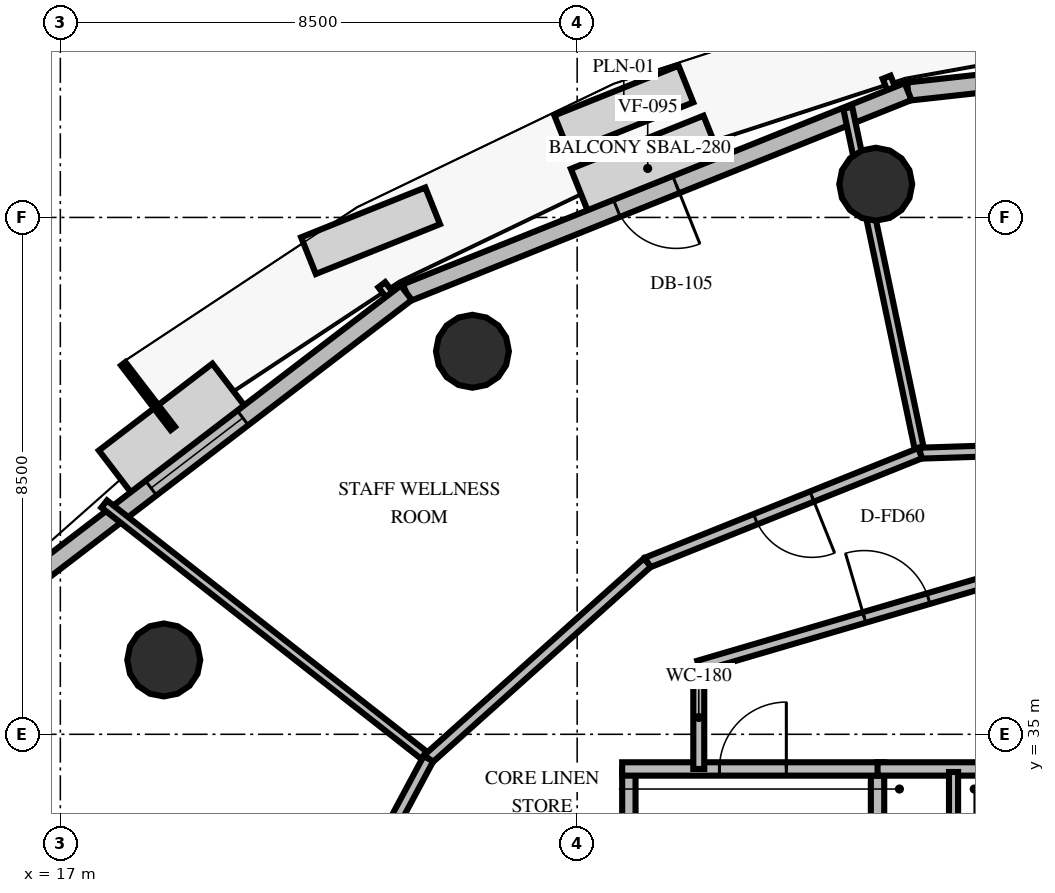
"""IFC4 building model, lengths in metres.
Left out: names, types, materials, properties, quantities, classifications, styles, units other than length and angle.
Written with IfcOpenShell. Run it as: python <this file> out.ifc"""

import sys

from ifc_helpers import new_model, si_unit, direction, frame, frame_2d, origin, origin_2d, place, context, subcontext, project, spatial, rectangle, circle, extrude, element, fill, save


model = new_model("IFC4")
c1 = context("Model", 3, precision=1e-05, world=origin(), true_north=direction((0.0, 1.0)))
c2 = subcontext(c1, "Body", "Model", "MODEL_VIEW")
j1 = project(units=[si_unit("LENGTHUNIT", "METRE"), si_unit("PLANEANGLEUNIT", "RADIAN")], contexts=[c1])
p1 = place(None, origin())
s1 = spatial("IfcSite", under=j1, at=p1, CompositionType="ELEMENT")
p2 = place(p1, origin())
s2 = spatial("IfcBuilding", under=s1, at=p2, CompositionType="ELEMENT")
p3 = place(p2, frame((0.0, 0.0, 125.8)))
s3 = spatial("IfcBuildingStorey", under=s2, at=p3, CompositionType="ELEMENT", Elevation=125.8)
for number, where, z_axis, x_axis in (
    (1, (30.41, 44.046, 0.0), (0.0, 0.0, 1.0), (1.0, 0.0, 0.0)),
    (2, (23.778, 41.299, 0.0), (0.0, 0.0, 1.0), (1.0, 0.0, 0.0)),
    (3, (18.701, 36.222, 0.0), (0.0, 0.0, 1.0), (1.0, 0.0, 0.0)),
):
    element("IfcColumn", number, at=place(p3, frame(where, z_axis=z_axis, x_axis=x_axis)), inside=s3, PredefinedType="COLUMN", context=c2, shape_type="SweptSolid", body=[
        extrude(circle(Radius=0.6, at=origin_2d()), origin(), (0.0, 0.0, 1.0), 4.0),
    ])
p4 = place(p3, frame((39.563, 46.519, 0.0), z_axis=(0.0, 0.0, 1.0), x_axis=(-0.99400193871, -0.109362451697, 0.0)))
e4 = element("IfcWall", 4, at=p4, inside=s3, PredefinedType="SOLIDWALL", context=c2, shape_type="SweptSolid", body=[
    extrude(rectangle(XDim=8.673, YDim=0.3, at=frame_2d((4.336, 0.0))), origin(), (0.0, 0.0, 1.0), 2.9),
])
p5 = place(p4, frame((3.386, 0.0, 0.8)))
e5 = element("IfcOpeningElement", 5, at=p5, cuts=e4, PredefinedType="OPENING", context=c2, shape_type="SweptSolid", body=[
    extrude(rectangle(XDim=1.9, YDim=1.95, at=frame_2d((0.95, 0.975))), frame((0.0, 0.16, 0.0), z_axis=(0.0, -1.0, 0.0), x_axis=(1.0, 0.0, 0.0)), (0.0, 0.0, 1.0), 0.32),
])
p6 = place(p3, frame((30.942, 45.57, 0.0), z_axis=(0.0, 0.0, 1.0), x_axis=(-0.928154394982, -0.372195404426, 0.0)))
e6 = element("IfcWall", 6, at=p6, inside=s3, PredefinedType="SOLIDWALL", context=c2, shape_type="SweptSolid", body=[
    extrude(rectangle(XDim=8.891, YDim=0.3, at=frame_2d((4.445, 0.0))), origin(), (0.0, 0.0, 1.0), 2.9),
])
p7 = place(p6, frame((4.11, 0.0, 0.0)))
e7 = element("IfcOpeningElement", 7, at=p7, cuts=e6, PredefinedType="OPENING", context=c2, shape_type="SweptSolid", body=[
    extrude(rectangle(XDim=1.05, YDim=2.15, at=frame_2d((0.525, 1.075))), frame((0.0, 0.16, 0.0), z_axis=(0.0, -1.0, 0.0), x_axis=(1.0, 0.0, 0.0)), (0.0, 0.0, 1.0), 0.32),
])
p8 = place(p3, frame((22.69, 42.261, 0.0), z_axis=(0.0, 0.0, 1.0), x_axis=(-0.794200404565, -0.607655920229, 0.0)))
e8 = element("IfcWall", 8, at=p8, inside=s3, PredefinedType="SOLIDWALL", context=c2, shape_type="SweptSolid", body=[
    extrude(rectangle(XDim=8.673, YDim=0.3, at=frame_2d((4.336, 0.0))), origin(), (0.0, 0.0, 1.0), 2.9),
])
p9 = place(p8, frame((3.386, 0.0, 0.8)))
e9 = element("IfcOpeningElement", 9, at=p9, cuts=e8, PredefinedType="OPENING", context=c2, shape_type="SweptSolid", body=[
    extrude(rectangle(XDim=1.9, YDim=1.95, at=frame_2d((0.95, 0.975))), frame((0.0, 0.16, 0.0), z_axis=(0.0, -1.0, 0.0), x_axis=(1.0, 0.0, 0.0)), (0.0, 0.0, 1.0), 0.32),
])
p10 = place(p3, frame((26.35, 30.05, 0.0), z_axis=(0.0, 0.0, 1.0), x_axis=(0.0, 1.0, 0.0)))
e10 = element("IfcWall", 10, at=p10, inside=s3, PredefinedType="SOLIDWALL", context=c2, shape_type="SweptSolid", body=[
    extrude(rectangle(XDim=4.38, YDim=0.22, at=frame_2d((2.19, 0.0))), origin(), (0.0, 0.0, 1.0), 2.8),
])
p11 = place(p3, frame((30.44, 30.05, 0.0), z_axis=(0.0, 0.0, 1.0), x_axis=(0.0, 1.0, 0.0)))
e11 = element("IfcWall", 11, at=p11, inside=s3, PredefinedType="SOLIDWALL", context=c2, shape_type="SweptSolid", body=[
    extrude(rectangle(XDim=4.38, YDim=0.22, at=frame_2d((2.19, 0.0))), origin(), (0.0, 0.0, 1.0), 2.8),
])
p12 = place(p11, frame((0.8, 0.0, 0.0)))
e12 = element("IfcOpeningElement", 12, at=p12, cuts=e11, PredefinedType="OPENING", context=c2, shape_type="SweptSolid", body=[
    extrude(rectangle(XDim=1.05, YDim=2.1, at=frame_2d((0.525, 1.05))), frame((0.0, 0.12, 0.0), z_axis=(0.0, -1.0, 0.0), x_axis=(1.0, 0.0, 0.0)), (0.0, 0.0, 1.0), 0.24),
])
p13 = place(p3, frame((26.24, 34.43, 0.0), z_axis=(0.0, 0.0, 1.0), x_axis=(1.0, 0.0, 0.0)))
e13 = element("IfcWall", 13, at=p13, inside=s3, PredefinedType="SOLIDWALL", context=c2, shape_type="SweptSolid", body=[
    extrude(rectangle(XDim=4.31, YDim=0.22, at=frame_2d((2.155, 0.0))), origin(), (0.0, 0.0, 1.0), 2.8),
])
p14 = place(p13, frame((1.6, 0.0, 0.0)))
e14 = element("IfcOpeningElement", 14, at=p14, cuts=e13, PredefinedType="OPENING", context=c2, shape_type="SweptSolid", body=[
    extrude(rectangle(XDim=1.1, YDim=2.15, at=frame_2d((0.55, 1.075))), frame((0.0, 0.12, 0.0), z_axis=(0.0, -1.0, 0.0), x_axis=(1.0, 0.0, 0.0)), (0.0, 0.0, 1.0), 0.24),
])
p15 = place(p3, frame((30.44, 34.43, 0.0), z_axis=(0.0, 0.0, 1.0), x_axis=(1.0, 0.0, 0.0)))
e15 = element("IfcWall", 15, at=p15, inside=s3, PredefinedType="SOLIDWALL", context=c2, shape_type="SweptSolid", body=[
    extrude(rectangle(XDim=7.12, YDim=0.22, at=frame_2d((3.56, 0.0))), origin(), (0.0, 0.0, 1.0), 2.8),
])
p16 = place(p15, frame((3.01, 0.0, 0.0)))
e16 = element("IfcOpeningElement", 16, at=p16, cuts=e15, PredefinedType="OPENING", context=c2, shape_type="SweptSolid", body=[
    extrude(rectangle(XDim=1.1, YDim=2.15, at=frame_2d((0.55, 1.075))), frame((0.0, 0.12, 0.0), z_axis=(0.0, -1.0, 0.0), x_axis=(1.0, 0.0, 0.0)), (0.0, 0.0, 1.0), 0.24),
])
p17 = place(p3, frame((31.69, 32.05, 0.0), z_axis=(0.0, 0.0, 1.0), x_axis=(0.0, 1.0, 0.0)))
e17 = element("IfcWall", 17, at=p17, inside=s3, PredefinedType="PARTITIONING", context=c2, shape_type="SweptSolid", body=[
    extrude(rectangle(XDim=2.33, YDim=0.15, at=frame_2d((1.165, 0.0))), origin(), (0.0, 0.0, 1.0), 2.8),
])
p18 = place(p17, frame((0.65, 0.0, 0.0)))
e18 = element("IfcOpeningElement", 18, at=p18, cuts=e17, PredefinedType="OPENING", context=c2, shape_type="SweptSolid", body=[
    extrude(rectangle(XDim=0.86, YDim=2.05, at=frame_2d((0.43, 1.025))), frame((0.0, 0.085, 0.0), z_axis=(0.0, -1.0, 0.0), x_axis=(1.0, 0.0, 0.0)), (0.0, 0.0, 1.0), 0.17),
])
p19 = place(p3, frame((27.5, 34.43, 0.0), z_axis=(0.0, 0.0, 1.0), x_axis=(0.0, 1.0, 0.0)))
e19 = element("IfcWall", 19, at=p19, inside=s3, PredefinedType="PARTITIONING", context=c2, shape_type="SweptSolid", body=[
    extrude(rectangle(XDim=1.693, YDim=0.18, at=frame_2d((0.846, 0.0))), origin(), (0.0, 0.0, 1.0), 2.8),
])
p20 = place(p3, frame((27.5, 36.123, 0.0), z_axis=(0.0, 0.0, 1.0), x_axis=(0.959546654541, 0.281549671923, 0.0)))
e20 = element("IfcWall", 20, at=p20, inside=s3, PredefinedType="PARTITIONING", context=c2, shape_type="SweptSolid", body=[
    extrude(rectangle(XDim=6.774, YDim=0.18, at=frame_2d((3.387, 0.0))), origin(), (0.0, 0.0, 1.0), 2.8),
])
p21 = place(p20, frame((2.837, 0.0, 0.0)))
e21 = element("IfcOpeningElement", 21, at=p21, cuts=e20, PredefinedType="OPENING", context=c2, shape_type="SweptSolid", body=[
    extrude(rectangle(XDim=1.1, YDim=2.15, at=frame_2d((0.55, 1.075))), frame((0.0, 0.1, 0.0), z_axis=(0.0, -1.0, 0.0), x_axis=(1.0, 0.0, 0.0)), (0.0, 0.0, 1.0), 0.2),
])
p22 = place(p3, frame((31.142, 39.623, 0.0), z_axis=(0.0, 0.0, 1.0), x_axis=(-0.205378628845, 0.978682593497, 0.0)))
e22 = element("IfcWall", 22, at=p22, inside=s3, PredefinedType="PARTITIONING", context=c2, shape_type="SweptSolid", body=[
    extrude(rectangle(XDim=5.803, YDim=0.15, at=frame_2d((2.902, 0.0))), origin(), (0.0, 0.0, 1.0), 2.8),
])
p23 = place(p3, frame((35.973, 39.779, 0.0), z_axis=(0.0, 0.0, 1.0), x_axis=(-0.999479168972, -0.032270587084, 0.0)))
e23 = element("IfcWall", 23, at=p23, inside=s3, PredefinedType="PARTITIONING", context=c2, shape_type="SweptSolid", body=[
    extrude(rectangle(XDim=4.834, YDim=0.18, at=frame_2d((2.417, 0.0))), origin(), (0.0, 0.0, 1.0), 2.8),
])
p24 = place(p3, frame((23.053, 34.599, 0.0), z_axis=(0.0, 0.0, 1.0), x_axis=(-0.786392054324, 0.61772772068, 0.0)))
e24 = element("IfcWall", 24, at=p24, inside=s3, PredefinedType="PARTITIONING", context=c2, shape_type="SweptSolid", body=[
    extrude(rectangle(XDim=6.78, YDim=0.15, at=frame_2d((3.39, 0.0))), origin(), (0.0, 0.0, 1.0), 2.8),
])
p25 = place(p3, frame((31.142, 39.623, 0.0), z_axis=(0.0, 0.0, 1.0), x_axis=(-0.928173370801, -0.372148080387, 0.0)))
e25 = element("IfcWall", 25, at=p25, inside=s3, PredefinedType="PARTITIONING", context=c2, shape_type="SweptSolid", body=[
    extrude(rectangle(XDim=4.834, YDim=0.18, at=frame_2d((2.417, 0.0))), origin(), (0.0, 0.0, 1.0), 2.8),
])
p26 = place(p25, frame((1.917, 0.0, 0.0)))
e26 = element("IfcOpeningElement", 26, at=p26, cuts=e25, PredefinedType="OPENING", context=c2, shape_type="SweptSolid", body=[
    extrude(rectangle(XDim=1.0, YDim=2.15, at=frame_2d((0.5, 1.075))), frame((0.0, 0.1, 0.0), z_axis=(0.0, -1.0, 0.0), x_axis=(1.0, 0.0, 0.0)), (0.0, 0.0, 1.0), 0.2),
])
p27 = place(p3, frame((26.655, 37.824, 0.0), z_axis=(0.0, 0.0, 1.0), x_axis=(-0.744874027172, -0.66720512861, 0.0)))
e27 = element("IfcWall", 27, at=p27, inside=s3, PredefinedType="PARTITIONING", context=c2, shape_type="SweptSolid", body=[
    extrude(rectangle(XDim=4.834, YDim=0.18, at=frame_2d((2.417, 0.0))), origin(), (0.0, 0.0, 1.0), 2.8),
])
p28 = place(p3, frame((23.053, 34.599, 0.0), z_axis=(0.0, 0.0, 1.0), x_axis=(-0.4717883109, -0.881711851853, 0.0)))
e28 = element("IfcWall", 28, at=p28, inside=s3, PredefinedType="PARTITIONING", context=c2, shape_type="SweptSolid", body=[
    extrude(rectangle(XDim=4.834, YDim=0.18, at=frame_2d((2.417, 0.0))), origin(), (0.0, 0.0, 1.0), 2.8),
])
p29 = place(p28, frame((2.801, 0.0, 0.0)))
e29 = element("IfcOpeningElement", 29, at=p29, cuts=e28, PredefinedType="OPENING", context=c2, shape_type="SweptSolid", body=[
    extrude(rectangle(XDim=1.0, YDim=2.15, at=frame_2d((0.5, 1.075))), frame((0.0, 0.1, 0.0), z_axis=(0.0, -1.0, 0.0), x_axis=(1.0, 0.0, 0.0)), (0.0, 0.0, 1.0), 0.2),
])
p30 = place(p7, origin())
e30 = element("IfcDoor", 30, at=p30, inside=s3, OperationType="SINGLE_SWING_LEFT", PredefinedType="DOOR", context=c2, shape_type="SweptSolid", body=[
    extrude(rectangle(XDim=1.05, YDim=2.15, at=frame_2d((0.525, 1.075))), frame((0.0, 0.025, 0.0), z_axis=(0.0, -1.0, 0.0), x_axis=(1.0, 0.0, 0.0)), (0.0, 0.0, 1.0), 0.05),
])
fill(e7, e30)
p31 = place(p9, origin())
e31 = element("IfcWindow", 31, at=p31, inside=s3, PartitioningType="SINGLE_PANEL", PredefinedType="WINDOW", context=c2, shape_type="SweptSolid", body=[
    extrude(rectangle(XDim=1.9, YDim=1.95, at=frame_2d((0.95, 0.975))), frame((0.0, 0.03, 0.0), z_axis=(0.0, -1.0, 0.0), x_axis=(1.0, 0.0, 0.0)), (0.0, 0.0, 1.0), 0.06),
])
fill(e9, e31)
p32 = place(p14, origin())
e32 = element("IfcDoor", 32, at=p32, inside=s3, OperationType="SINGLE_SWING_RIGHT", PredefinedType="DOOR", context=c2, shape_type="SweptSolid", body=[
    extrude(rectangle(XDim=1.1, YDim=2.15, at=frame_2d((0.55, 1.075))), frame((0.0, 0.025, 0.0), z_axis=(0.0, -1.0, 0.0), x_axis=(1.0, 0.0, 0.0)), (0.0, 0.0, 1.0), 0.05),
])
fill(e14, e32)
p33 = place(p21, origin())
e33 = element("IfcDoor", 33, at=p33, inside=s3, OperationType="SINGLE_SWING_LEFT", PredefinedType="DOOR", context=c2, shape_type="SweptSolid", body=[
    extrude(rectangle(XDim=1.1, YDim=2.15, at=frame_2d((0.55, 1.075))), frame((0.0, 0.025, 0.0), z_axis=(0.0, -1.0, 0.0), x_axis=(1.0, 0.0, 0.0)), (0.0, 0.0, 1.0), 0.05),
])
fill(e21, e33)
p34 = place(p26, origin())
e34 = element("IfcDoor", 34, at=p34, inside=s3, OperationType="SINGLE_SWING_LEFT", PredefinedType="DOOR", context=c2, shape_type="SweptSolid", body=[
    extrude(rectangle(XDim=1.0, YDim=2.15, at=frame_2d((0.5, 1.075))), frame((0.0, 0.025, 0.0), z_axis=(0.0, -1.0, 0.0), x_axis=(1.0, 0.0, 0.0)), (0.0, 0.0, 1.0), 0.05),
])
fill(e26, e34)
save(model, sys.argv[1])
